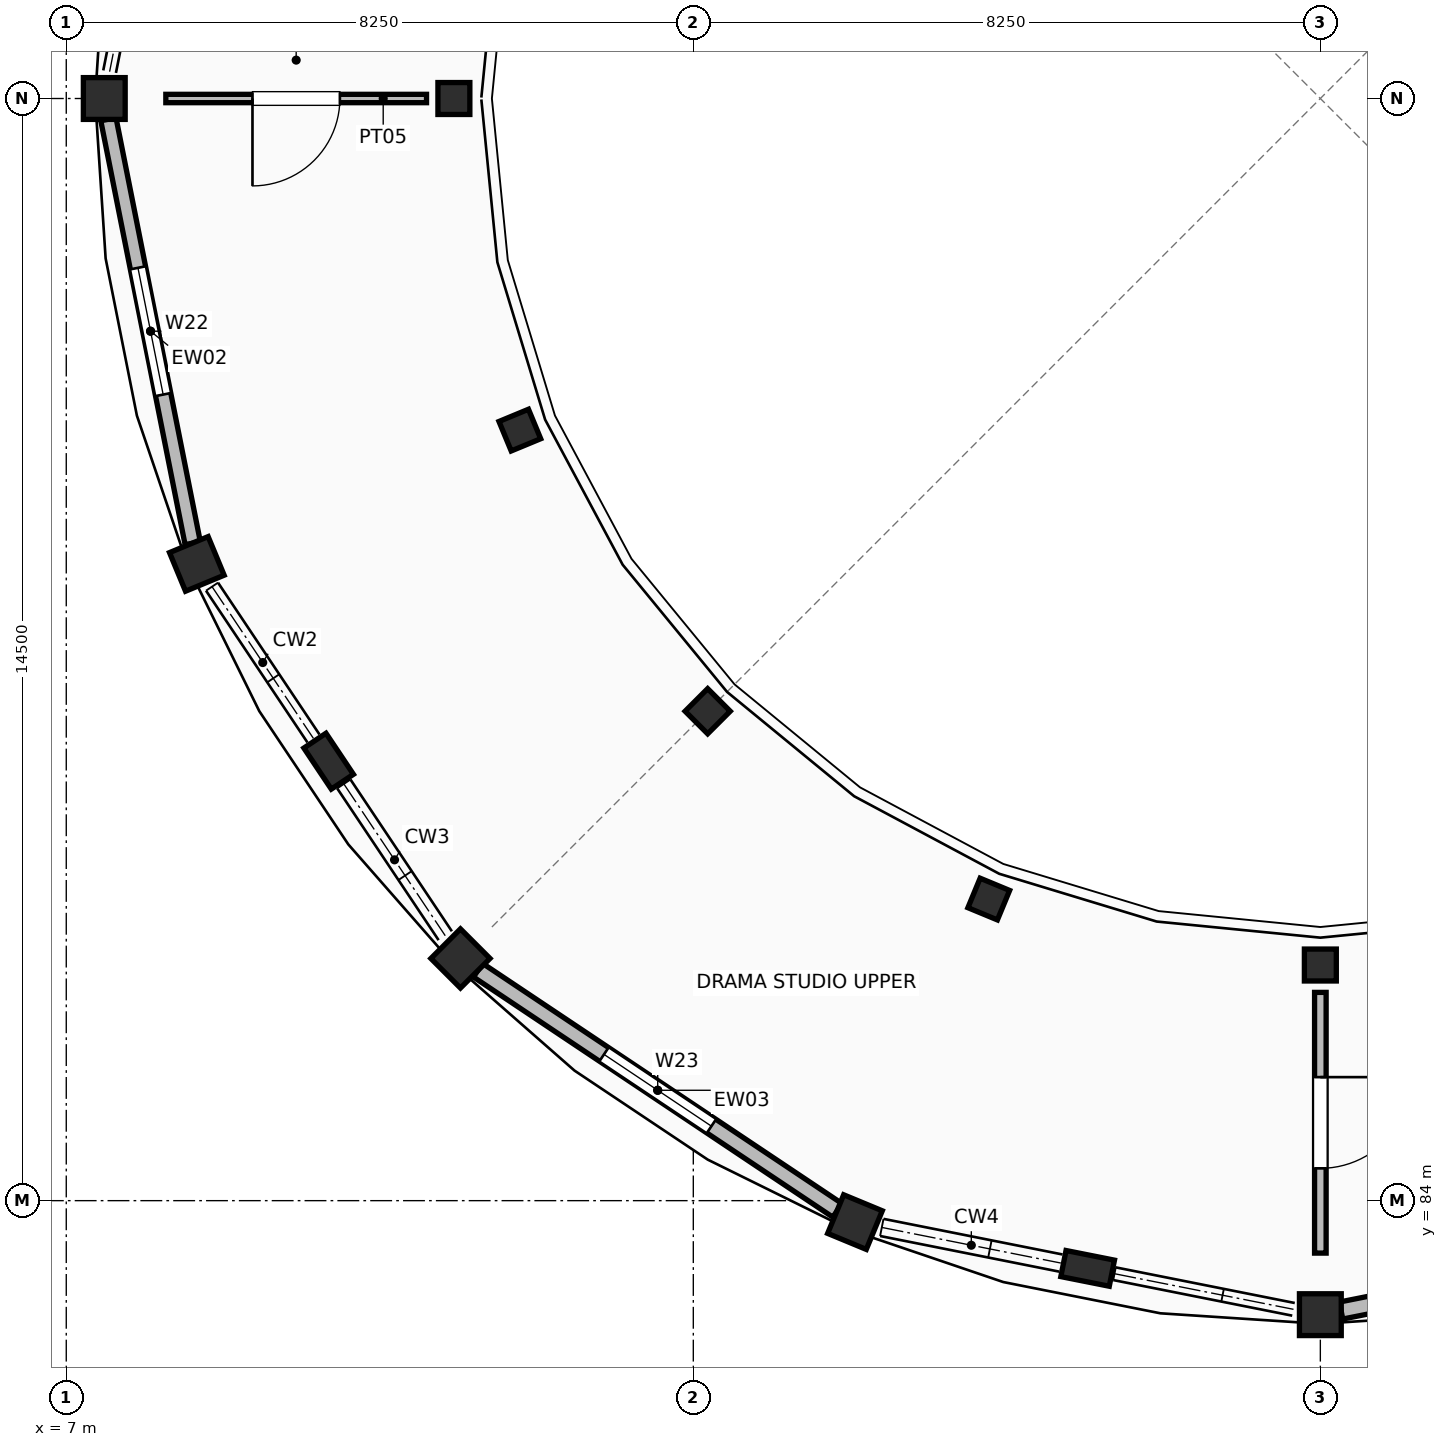
"""IFC4 building model, lengths in metres.
Left out: names, types, materials, properties, quantities, classifications, styles, units other than length and angle.
Written with IfcOpenShell. Run it as: python <this file> out.ifc"""

import sys

from ifc_helpers import new_model, si_unit, direction, frame, frame_2d, origin, origin_2d, place, context, subcontext, project, spatial, rectangle, extrude, element, fill, save


model = new_model("IFC4")
c1 = context("Model", 3, precision=1e-05, world=origin(), true_north=direction((0.0, 1.0)))
c2 = subcontext(c1, "Body", "Model", "MODEL_VIEW")
j1 = project(units=[si_unit("LENGTHUNIT", "METRE"), si_unit("PLANEANGLEUNIT", "RADIAN")], contexts=[c1])
p1 = place(None, origin())
s1 = spatial("IfcSite", under=j1, at=p1, CompositionType="ELEMENT")
p2 = place(p1, origin())
s2 = spatial("IfcBuilding", under=s1, at=p2, CompositionType="ELEMENT")
p3 = place(p2, frame((0.0, 0.0, 4.42)))
s3 = spatial("IfcBuildingStorey", under=s2, at=p3, CompositionType="ELEMENT", Elevation=4.42)
p4 = place(p3, frame((12.1, 98.5, 0.0), z_axis=(0.0, 0.0, 1.0), x_axis=(-1.0, 0.0, 0.0)))
e1 = element("IfcColumn", 1, at=p4, inside=s3, PredefinedType="COLUMN", context=c2, shape_type="SweptSolid", body=[
    extrude(rectangle(XDim=0.42, YDim=0.42, at=origin_2d()), origin(), (0.0, 0.0, 1.0), 3.74),
])
p5 = place(p3, frame((7.5, 98.5, 0.0), z_axis=(0.0, 0.0, 1.0), x_axis=(-1.0, 0.0, 0.0)))
e2 = element("IfcColumn", 2, at=p5, inside=s3, PredefinedType="COLUMN", context=c2, shape_type="SweptSolid", body=[
    extrude(rectangle(XDim=0.55, YDim=0.55, at=origin_2d()), origin(), (0.0, 0.0, 1.0), 3.74),
])
p6 = place(p3, frame((12.968, 94.137, 0.0), z_axis=(0.0, 0.0, 1.0), x_axis=(-0.923879532511, -0.382683432365, 0.0)))
e3 = element("IfcColumn", 3, at=p6, inside=s3, PredefinedType="COLUMN", context=c2, shape_type="SweptSolid", body=[
    extrude(rectangle(XDim=0.42, YDim=0.42, at=origin_2d()), origin(), (0.0, 0.0, 1.0), 3.74),
])
p7 = place(p3, frame((8.718, 92.377, 0.0), z_axis=(0.0, 0.0, 1.0), x_axis=(-0.923879532511, -0.382683432365, 0.0)))
e4 = element("IfcColumn", 4, at=p7, inside=s3, PredefinedType="COLUMN", context=c2, shape_type="SweptSolid", body=[
    extrude(rectangle(XDim=0.55, YDim=0.55, at=origin_2d()), origin(), (0.0, 0.0, 1.0), 3.74),
])
p8 = place(p3, frame((15.439, 90.439, 0.0), z_axis=(0.0, 0.0, 1.0), x_axis=(-0.707106781187, -0.707106781187, 0.0)))
e5 = element("IfcColumn", 5, at=p8, inside=s3, PredefinedType="COLUMN", context=c2, shape_type="SweptSolid", body=[
    extrude(rectangle(XDim=0.42, YDim=0.42, at=origin_2d()), origin(), (0.0, 0.0, 1.0), 3.74),
])
p9 = place(p3, frame((12.186, 87.186, 0.0), z_axis=(0.0, 0.0, 1.0), x_axis=(-0.707106781187, -0.707106781187, 0.0)))
e6 = element("IfcColumn", 6, at=p9, inside=s3, PredefinedType="COLUMN", context=c2, shape_type="SweptSolid", body=[
    extrude(rectangle(XDim=0.55, YDim=0.55, at=origin_2d()), origin(), (0.0, 0.0, 1.0), 3.74),
])
p10 = place(p3, frame((19.137, 87.968, 0.0), z_axis=(0.0, 0.0, 1.0), x_axis=(-0.382683432365, -0.923879532511, 0.0)))
e7 = element("IfcColumn", 7, at=p10, inside=s3, PredefinedType="COLUMN", context=c2, shape_type="SweptSolid", body=[
    extrude(rectangle(XDim=0.42, YDim=0.42, at=origin_2d()), origin(), (0.0, 0.0, 1.0), 3.74),
])
p11 = place(p3, frame((17.377, 83.718, 0.0), z_axis=(0.0, 0.0, 1.0), x_axis=(-0.382683432365, -0.923879532511, 0.0)))
e8 = element("IfcColumn", 8, at=p11, inside=s3, PredefinedType="COLUMN", context=c2, shape_type="SweptSolid", body=[
    extrude(rectangle(XDim=0.55, YDim=0.55, at=origin_2d()), origin(), (0.0, 0.0, 1.0), 3.74),
])
p12 = place(p3, frame((23.5, 87.1, 0.0), z_axis=(0.0, 0.0, 1.0), x_axis=(0.0, -1.0, 0.0)))
e9 = element("IfcColumn", 9, at=p12, inside=s3, PredefinedType="COLUMN", context=c2, shape_type="SweptSolid", body=[
    extrude(rectangle(XDim=0.42, YDim=0.42, at=origin_2d()), origin(), (0.0, 0.0, 1.0), 3.74),
])
p13 = place(p3, frame((23.5, 82.5, 0.0), z_axis=(0.0, 0.0, 1.0), x_axis=(0.0, -1.0, 0.0)))
e10 = element("IfcColumn", 10, at=p13, inside=s3, PredefinedType="COLUMN", context=c2, shape_type="SweptSolid", body=[
    extrude(rectangle(XDim=0.55, YDim=0.55, at=origin_2d()), origin(), (0.0, 0.0, 1.0), 3.74),
])
for number, where, z_axis, x_axis in (
    (11, (10.452, 89.782, 0.0), (0.0, 0.0, 1.0), (-0.831, -0.556, 0.0)),
    (12, (20.438, 83.109, 0.0), (0.0, 0.0, 1.0), (-0.195, -0.981, 0.0)),
):
    element("IfcColumn", number, at=place(p3, frame(where, z_axis=z_axis, x_axis=x_axis)), inside=s3, PredefinedType="PILASTER", context=c2, shape_type="SweptSolid", body=[
        extrude(rectangle(XDim=0.35, YDim=0.65, at=origin_2d()), origin(), (0.0, 0.0, 1.0), 3.74),
    ])
p14 = place(p3, frame((7.554, 98.227, 0.0), z_axis=(0.0, 0.0, 1.0), x_axis=(0.195075787902, -0.980788171306, 0.0)))
e13 = element("IfcWall", 13, at=p14, inside=s3, PredefinedType="STANDARD", context=c2, shape_type="SweptSolid", body=[
    extrude(rectangle(XDim=5.687, YDim=0.204, at=frame_2d((2.844, 0.0))), origin(), (0.0, 0.0, 1.0), 2.78),
])
p15 = place(p14, frame((1.993, 0.0, 0.95)))
e14 = element("IfcOpeningElement", 14, at=p15, cuts=e13, PredefinedType="OPENING", context=c2, shape_type="SweptSolid", body=[
    extrude(rectangle(XDim=1.7, YDim=1.3, at=frame_2d((0.85, 0.65))), frame((0.0, 0.112, 0.0), z_axis=(0.0, -1.0, 0.0), x_axis=(1.0, 0.0, 0.0)), (0.0, 0.0, 1.0), 0.224),
])
p16 = place(p3, frame((12.417, 87.032, 0.0), z_axis=(0.0, 0.0, 1.0), x_axis=(0.831475241541, -0.555561808177, 0.0)))
e15 = element("IfcWall", 15, at=p16, inside=s3, PredefinedType="STANDARD", context=c2, shape_type="SweptSolid", body=[
    extrude(rectangle(XDim=5.687, YDim=0.216, at=frame_2d((2.844, 0.0))), origin(), (0.0, 0.0, 1.0), 2.78),
])
p17 = place(p16, frame((1.993, 0.0, 0.95)))
e16 = element("IfcOpeningElement", 16, at=p17, cuts=e15, PredefinedType="OPENING", context=c2, shape_type="SweptSolid", body=[
    extrude(rectangle(XDim=1.7, YDim=1.45, at=frame_2d((0.85, 0.725))), frame((0.0, 0.118, 0.0), z_axis=(0.0, -1.0, 0.0), x_axis=(1.0, 0.0, 0.0)), (0.0, 0.0, 1.0), 0.236),
])
p18 = place(p3, frame((23.773, 82.554, 0.0), z_axis=(0.0, 0.0, 1.0), x_axis=(0.980788171306, 0.195075787902, 0.0)))
e17 = element("IfcWall", 17, at=p18, inside=s3, PredefinedType="STANDARD", context=c2, shape_type="SweptSolid", body=[
    extrude(rectangle(XDim=5.687, YDim=0.228, at=frame_2d((2.844, 0.0))), origin(), (0.0, 0.0, 1.0), 2.78),
])
p19 = place(p18, frame((1.993, 0.0, 0.95)))
e18 = element("IfcOpeningElement", 18, at=p19, cuts=e17, PredefinedType="OPENING", context=c2, shape_type="SweptSolid", body=[
    extrude(rectangle(XDim=1.7, YDim=1.6, at=frame_2d((0.85, 0.8))), frame((0.0, 0.124, 0.0), z_axis=(0.0, -1.0, 0.0), x_axis=(1.0, 0.0, 0.0)), (0.0, 0.0, 1.0), 0.248),
])
p20 = place(p3, frame((11.74, 98.5, 0.0), z_axis=(0.0, 0.0, 1.0), x_axis=(-1.0, 0.0, 0.0)))
e19 = element("IfcWall", 19, at=p20, inside=s3, PredefinedType="PARTITIONING", context=c2, shape_type="SweptSolid", body=[
    extrude(rectangle(XDim=3.43, YDim=0.11, at=frame_2d((1.715, 0.0))), origin(), (0.0, 0.0, 1.0), 2.75),
])
p21 = place(p20, frame((1.14, 0.0, 0.0)))
e20 = element("IfcOpeningElement", 20, at=p21, cuts=e19, PredefinedType="OPENING", context=c2, shape_type="SweptSolid", body=[
    extrude(rectangle(XDim=1.15, YDim=2.12, at=frame_2d((0.575, 1.06))), frame((0.0, 0.065, 0.0), z_axis=(0.0, -1.0, 0.0), x_axis=(1.0, 0.0, 0.0)), (0.0, 0.0, 1.0), 0.13),
])
p22 = place(p3, frame((23.5, 86.74, 0.0), z_axis=(0.0, 0.0, 1.0), x_axis=(0.0, -1.0, 0.0)))
e21 = element("IfcWall", 21, at=p22, inside=s3, PredefinedType="PARTITIONING", context=c2, shape_type="SweptSolid", body=[
    extrude(rectangle(XDim=3.43, YDim=0.152, at=frame_2d((1.715, 0.0))), origin(), (0.0, 0.0, 1.0), 2.75),
])
p23 = place(p22, frame((1.115, 0.0, 0.0)))
e22 = element("IfcOpeningElement", 22, at=p23, cuts=e21, PredefinedType="OPENING", context=c2, shape_type="SweptSolid", body=[
    extrude(rectangle(XDim=1.2, YDim=2.18, at=frame_2d((0.6, 1.09))), frame((0.0, 0.086, 0.0), z_axis=(0.0, -1.0, 0.0), x_axis=(1.0, 0.0, 0.0)), (0.0, 0.0, 1.0), 0.172),
])
p24 = place(p15, origin())
e23 = element("IfcWindow", 23, at=p24, inside=s3, PartitioningType="SINGLE_PANEL", PredefinedType="WINDOW", context=c2, shape_type="SweptSolid", body=[
    extrude(rectangle(XDim=1.7, YDim=1.3, at=frame_2d((0.85, 0.65))), frame((0.0, 0.03, 0.0), z_axis=(0.0, -1.0, 0.0), x_axis=(1.0, 0.0, 0.0)), (0.0, 0.0, 1.0), 0.06),
])
fill(e14, e23)
p25 = place(p17, origin())
e24 = element("IfcWindow", 24, at=p25, inside=s3, PartitioningType="SINGLE_PANEL", PredefinedType="WINDOW", context=c2, shape_type="SweptSolid", body=[
    extrude(rectangle(XDim=1.7, YDim=1.45, at=frame_2d((0.85, 0.725))), frame((0.0, 0.03, 0.0), z_axis=(0.0, -1.0, 0.0), x_axis=(1.0, 0.0, 0.0)), (0.0, 0.0, 1.0), 0.06),
])
fill(e16, e24)
p26 = place(p21, frame((1.15, 0.0, 0.0), z_axis=(0.0, 0.0, 1.0), x_axis=(-1.0, 0.0, 0.0)))
e25 = element("IfcDoor", 25, at=p26, inside=s3, OperationType="SINGLE_SWING_RIGHT", PredefinedType="DOOR", context=c2, shape_type="SweptSolid", body=[
    extrude(rectangle(XDim=1.15, YDim=2.12, at=frame_2d((0.575, 1.06))), frame((0.0, 0.025, 0.0), z_axis=(0.0, -1.0, 0.0), x_axis=(1.0, 0.0, 0.0)), (0.0, 0.0, 1.0), 0.05),
])
fill(e20, e25)
p27 = place(p23, origin())
e26 = element("IfcDoor", 26, at=p27, inside=s3, OperationType="SINGLE_SWING_LEFT", PredefinedType="DOOR", context=c2, shape_type="SweptSolid", body=[
    extrude(rectangle(XDim=1.2, YDim=2.18, at=frame_2d((0.6, 1.09))), frame((0.0, 0.025, 0.0), z_axis=(0.0, -1.0, 0.0), x_axis=(1.0, 0.0, 0.0)), (0.0, 0.0, 1.0), 0.05),
])
fill(e22, e26)
save(model, sys.argv[1])
